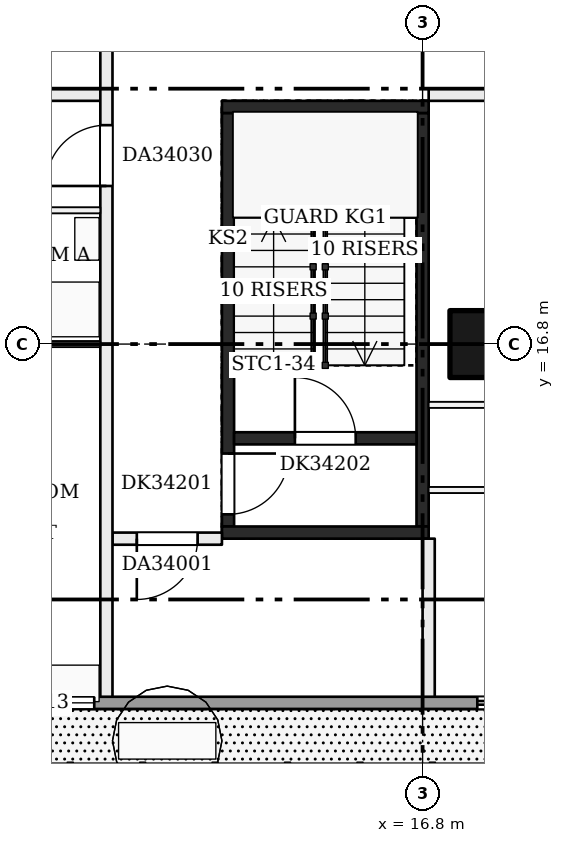
"""IFC4 building model, lengths in metres.
Left out: names, types, materials, properties, quantities, classifications, styles, units other than length and angle.
Written with IfcOpenShell. Run it as: python <this file> out.ifc"""

import sys

from ifc_helpers import new_model, si_unit, direction, frame, frame_2d, origin, origin_2d, place, context, subcontext, project, spatial, rectangle, extrude, element, fill, save


model = new_model("IFC4")
c1 = context("Model", 3, precision=1e-05, world=origin(), true_north=direction((0.0, 1.0)))
c2 = subcontext(c1, "Body", "Model", "MODEL_VIEW")
j1 = project(units=[si_unit("LENGTHUNIT", "METRE"), si_unit("PLANEANGLEUNIT", "RADIAN")], contexts=[c1])
p1 = place(None, origin())
s1 = spatial("IfcSite", under=j1, at=p1, CompositionType="ELEMENT")
p2 = place(p1, origin())
s2 = spatial("IfcBuilding", under=s1, at=p2, CompositionType="ELEMENT")
p3 = place(p2, frame((0.0, 0.0, 133.7)))
s3 = spatial("IfcBuildingStorey", under=s2, at=p3, CompositionType="ELEMENT", Elevation=133.7)
p4 = place(p3, frame((17.8, 16.8, 0.0), z_axis=(0.0, 0.0, 1.0), x_axis=(1.0, 0.0, 0.0)))
e1 = element("IfcColumn", 1, at=p4, inside=s3, PredefinedType="COLUMN", context=c2, shape_type="SweptSolid", body=[
    extrude(rectangle(XDim=1.1, YDim=1.1, at=origin_2d()), origin(), (0.0, 0.0, 1.0), 3.22),
])
p5 = place(p3, frame((13.6, 13.8, 0.0), z_axis=(0.0, 0.0, 1.0), x_axis=(0.0, 1.0, 0.0)))
e2 = element("IfcWall", 2, at=p5, inside=s3, PredefinedType="SHEAR", context=c2, shape_type="SweptSolid", body=[
    extrude(rectangle(XDim=6.8, YDim=0.2, at=frame_2d((3.4, 0.0))), origin(), (0.0, 0.0, 1.0), 3.22),
])
p6 = place(p5, frame((0.2, 0.0, 0.0)))
e3 = element("IfcOpeningElement", 3, at=p6, cuts=e2, PredefinedType="OPENING", context=c2, shape_type="SweptSolid", body=[
    extrude(rectangle(XDim=1.0, YDim=2.1, at=frame_2d((0.5, 1.05))), frame((0.0, 0.11, 0.0), z_axis=(0.0, -1.0, 0.0), x_axis=(1.0, 0.0, 0.0)), (0.0, 0.0, 1.0), 0.22),
])
p7 = place(p3, frame((16.8, 13.8, 0.0), z_axis=(0.0, 0.0, 1.0), x_axis=(0.0, 1.0, 0.0)))
e4 = element("IfcWall", 4, at=p7, inside=s3, PredefinedType="SHEAR", context=c2, shape_type="SweptSolid", body=[
    extrude(rectangle(XDim=6.8, YDim=0.2, at=frame_2d((3.4, 0.0))), origin(), (0.0, 0.0, 1.0), 3.22),
])
for number, where, z_axis, x_axis in (
    (5, (13.5, 13.7, 0.0), (0.0, 0.0, 1.0), (1.0, 0.0, 0.0)),
    (6, (13.5, 20.7, 0.0), (0.0, 0.0, 1.0), (1.0, 0.0, 0.0)),
):
    element("IfcWall", number, at=place(p3, frame(where, z_axis=z_axis, x_axis=x_axis)), inside=s3, PredefinedType="SHEAR", context=c2, shape_type="SweptSolid", body=[
        extrude(rectangle(XDim=3.4, YDim=0.2, at=frame_2d((1.7, 0.0))), origin(), (0.0, 0.0, 1.0), 3.22),
    ])
p8 = place(p3, frame((13.7, 15.25, 0.0), z_axis=(0.0, 0.0, 1.0), x_axis=(1.0, 0.0, 0.0)))
e7 = element("IfcWall", 7, at=p8, inside=s3, PredefinedType="SHEAR", context=c2, shape_type="SweptSolid", body=[
    extrude(rectangle(XDim=3.0, YDim=0.2, at=frame_2d((1.5, 0.0))), origin(), (0.0, 0.0, 1.0), 3.22),
])
p9 = place(p8, frame((1.0, 0.0, 0.0)))
e8 = element("IfcOpeningElement", 8, at=p9, cuts=e7, PredefinedType="OPENING", context=c2, shape_type="SweptSolid", body=[
    extrude(rectangle(XDim=1.0, YDim=2.1, at=frame_2d((0.5, 1.05))), frame((0.0, 0.11, 0.0), z_axis=(0.0, -1.0, 0.0), x_axis=(1.0, 0.0, 0.0)), (0.0, 0.0, 1.0), 0.22),
])
p10 = place(p3, frame((11.7, 13.6, 0.0), z_axis=(0.0, 0.0, 1.0), x_axis=(1.0, 0.0, 0.0)))
e9 = element("IfcWall", 9, at=p10, inside=s3, PredefinedType="PARTITIONING", context=c2, shape_type="SweptSolid", body=[
    extrude(rectangle(XDim=1.8, YDim=0.2, at=frame_2d((0.9, 0.0))), origin(), (0.0, 0.0, 1.0), 3.22),
])
p11 = place(p10, frame((0.4, 0.0, 0.0)))
e10 = element("IfcOpeningElement", 10, at=p11, cuts=e9, PredefinedType="OPENING", context=c2, shape_type="SweptSolid", body=[
    extrude(rectangle(XDim=1.0, YDim=2.1, at=frame_2d((0.5, 1.05))), frame((0.0, 0.11, 0.0), z_axis=(0.0, -1.0, 0.0), x_axis=(1.0, 0.0, 0.0)), (0.0, 0.0, 1.0), 0.22),
])
p12 = place(p3, frame((16.9, 14.4, 0.0), z_axis=(0.0, 0.0, 1.0), x_axis=(1.0, 0.0, 0.0)))
e11 = element("IfcWall", 11, at=p12, inside=s3, PredefinedType="PARTITIONING", context=c2, shape_type="SweptSolid", body=[
    extrude(rectangle(XDim=23.1, YDim=0.1, at=frame_2d((11.55, 0.0))), origin(), (0.0, 0.0, 1.0), 3.22),
])
p13 = place(p12, frame((5.8, 0.0, 0.0)))
e12 = element("IfcOpeningElement", 12, at=p13, cuts=e11, PredefinedType="OPENING", context=c2, shape_type="SweptSolid", body=[
    extrude(rectangle(XDim=0.9, YDim=2.1, at=frame_2d((0.45, 1.05))), frame((0.0, 0.06, 0.0), z_axis=(0.0, -1.0, 0.0), x_axis=(1.0, 0.0, 0.0)), (0.0, 0.0, 1.0), 0.12),
])
p14 = place(p12, frame((14.1, 0.0, 0.0)))
e13 = element("IfcOpeningElement", 13, at=p14, cuts=e11, PredefinedType="OPENING", context=c2, shape_type="SweptSolid", body=[
    extrude(rectangle(XDim=0.9, YDim=2.1, at=frame_2d((0.45, 1.05))), frame((0.0, 0.06, 0.0), z_axis=(0.0, -1.0, 0.0), x_axis=(1.0, 0.0, 0.0)), (0.0, 0.0, 1.0), 0.12),
])
p15 = place(p12, frame((19.5, 0.0, 0.0)))
e14 = element("IfcOpeningElement", 14, at=p15, cuts=e11, PredefinedType="OPENING", context=c2, shape_type="SweptSolid", body=[
    extrude(rectangle(XDim=0.9, YDim=2.1, at=frame_2d((0.45, 1.05))), frame((0.0, 0.06, 0.0), z_axis=(0.0, -1.0, 0.0), x_axis=(1.0, 0.0, 0.0)), (0.0, 0.0, 1.0), 0.12),
])
p16 = place(p3, frame((16.9, 15.8, 0.0), z_axis=(0.0, 0.0, 1.0), x_axis=(1.0, 0.0, 0.0)))
e15 = element("IfcWall", 15, at=p16, inside=s3, PredefinedType="PARTITIONING", context=c2, shape_type="SweptSolid", body=[
    extrude(rectangle(XDim=23.1, YDim=0.1, at=frame_2d((11.55, 0.0))), origin(), (0.0, 0.0, 1.0), 3.22),
])
p17 = place(p16, frame((1.7, 0.0, 0.0)))
e16 = element("IfcOpeningElement", 16, at=p17, cuts=e15, PredefinedType="OPENING", context=c2, shape_type="SweptSolid", body=[
    extrude(rectangle(XDim=0.9, YDim=2.1, at=frame_2d((0.45, 1.05))), frame((0.0, 0.06, 0.0), z_axis=(0.0, -1.0, 0.0), x_axis=(1.0, 0.0, 0.0)), (0.0, 0.0, 1.0), 0.12),
])
p18 = place(p16, frame((5.2, 0.0, 0.0)))
e17 = element("IfcOpeningElement", 17, at=p18, cuts=e15, PredefinedType="OPENING", context=c2, shape_type="SweptSolid", body=[
    extrude(rectangle(XDim=0.9, YDim=2.1, at=frame_2d((0.45, 1.05))), frame((0.0, 0.06, 0.0), z_axis=(0.0, -1.0, 0.0), x_axis=(1.0, 0.0, 0.0)), (0.0, 0.0, 1.0), 0.12),
])
p19 = place(p16, frame((9.4, 0.0, 0.0)))
e18 = element("IfcOpeningElement", 18, at=p19, cuts=e15, PredefinedType="OPENING", context=c2, shape_type="SweptSolid", body=[
    extrude(rectangle(XDim=0.9, YDim=2.1, at=frame_2d((0.45, 1.05))), frame((0.0, 0.06, 0.0), z_axis=(0.0, -1.0, 0.0), x_axis=(1.0, 0.0, 0.0)), (0.0, 0.0, 1.0), 0.12),
])
p20 = place(p16, frame((13.3, 0.0, 0.0)))
e19 = element("IfcOpeningElement", 19, at=p20, cuts=e15, PredefinedType="OPENING", context=c2, shape_type="SweptSolid", body=[
    extrude(rectangle(XDim=0.9, YDim=2.1, at=frame_2d((0.45, 1.05))), frame((0.0, 0.06, 0.0), z_axis=(0.0, -1.0, 0.0), x_axis=(1.0, 0.0, 0.0)), (0.0, 0.0, 1.0), 0.12),
])
p21 = place(p16, frame((17.5, 0.0, 0.0)))
e20 = element("IfcOpeningElement", 20, at=p21, cuts=e15, PredefinedType="OPENING", context=c2, shape_type="SweptSolid", body=[
    extrude(rectangle(XDim=0.9, YDim=2.1, at=frame_2d((0.45, 1.05))), frame((0.0, 0.06, 0.0), z_axis=(0.0, -1.0, 0.0), x_axis=(1.0, 0.0, 0.0)), (0.0, 0.0, 1.0), 0.12),
])
p22 = place(p16, frame((20.8, 0.0, 0.0)))
e21 = element("IfcOpeningElement", 21, at=p22, cuts=e15, PredefinedType="OPENING", context=c2, shape_type="SweptSolid", body=[
    extrude(rectangle(XDim=0.9, YDim=2.1, at=frame_2d((0.45, 1.05))), frame((0.0, 0.06, 0.0), z_axis=(0.0, -1.0, 0.0), x_axis=(1.0, 0.0, 0.0)), (0.0, 0.0, 1.0), 0.12),
])
p23 = place(p3, frame((2.5, 16.8, 0.0), z_axis=(0.0, 0.0, 1.0), x_axis=(1.0, 0.0, 0.0)))
e22 = element("IfcWall", 22, at=p23, inside=s3, PredefinedType="PARTITIONING", context=c2, shape_type="SweptSolid", body=[
    extrude(rectangle(XDim=9.0, YDim=0.1, at=frame_2d((4.5, 0.0))), origin(), (0.0, 0.0, 1.0), 3.22),
])
p24 = place(p23, frame((3.8, 0.0, 0.0)))
e23 = element("IfcOpeningElement", 23, at=p24, cuts=e22, PredefinedType="OPENING", context=c2, shape_type="SweptSolid", body=[
    extrude(rectangle(XDim=0.9, YDim=2.1, at=frame_2d((0.45, 1.05))), frame((0.0, 0.06, 0.0), z_axis=(0.0, -1.0, 0.0), x_axis=(1.0, 0.0, 0.0)), (0.0, 0.0, 1.0), 0.12),
])
p25 = place(p3, frame((7.65, 19.0, 0.0), z_axis=(0.0, 0.0, 1.0), x_axis=(1.0, 0.0, 0.0)))
e24 = element("IfcWall", 24, at=p25, inside=s3, PredefinedType="PARTITIONING", context=c2, shape_type="SweptSolid", body=[
    extrude(rectangle(XDim=3.85, YDim=0.1, at=frame_2d((1.925, 0.0))), origin(), (0.0, 0.0, 1.0), 3.22),
])
p26 = place(p3, frame((2.5, 20.9, 0.0), z_axis=(0.0, 0.0, 1.0), x_axis=(1.0, 0.0, 0.0)))
e25 = element("IfcWall", 25, at=p26, inside=s3, PredefinedType="PARTITIONING", context=c2, shape_type="SweptSolid", body=[
    extrude(rectangle(XDim=9.0, YDim=0.2, at=frame_2d((4.5, 0.0))), origin(), (0.0, 0.0, 1.0), 3.22),
])
p27 = place(p3, frame((16.9, 20.9, 0.0), z_axis=(0.0, 0.0, 1.0), x_axis=(1.0, 0.0, 0.0)))
e26 = element("IfcWall", 26, at=p27, inside=s3, PredefinedType="PARTITIONING", context=c2, shape_type="SweptSolid", body=[
    extrude(rectangle(XDim=23.3, YDim=0.2, at=frame_2d((11.65, 0.0))), origin(), (0.0, 0.0, 1.0), 3.22),
])
p28 = place(p27, frame((1.4, 0.0, 0.0)))
e27 = element("IfcOpeningElement", 27, at=p28, cuts=e26, PredefinedType="OPENING", context=c2, shape_type="SweptSolid", body=[
    extrude(rectangle(XDim=1.0, YDim=2.1, at=frame_2d((0.5, 1.05))), frame((0.0, 0.11, 0.0), z_axis=(0.0, -1.0, 0.0), x_axis=(1.0, 0.0, 0.0)), (0.0, 0.0, 1.0), 0.22),
])
p29 = place(p3, frame((11.6, 10.9, 0.0), z_axis=(0.0, 0.0, 1.0), x_axis=(0.0, 1.0, 0.0)))
e28 = element("IfcWall", 28, at=p29, inside=s3, PredefinedType="PARTITIONING", context=c2, shape_type="SweptSolid", body=[
    extrude(rectangle(XDim=31.1, YDim=0.2, at=frame_2d((15.55, 0.0))), origin(), (0.0, 0.0, 1.0), 3.22),
])
p30 = place(p29, frame((8.5, 0.0, 0.0)))
e29 = element("IfcOpeningElement", 29, at=p30, cuts=e28, PredefinedType="OPENING", context=c2, shape_type="SweptSolid", body=[
    extrude(rectangle(XDim=1.0, YDim=2.1, at=frame_2d((0.5, 1.05))), frame((0.0, 0.11, 0.0), z_axis=(0.0, -1.0, 0.0), x_axis=(1.0, 0.0, 0.0)), (0.0, 0.0, 1.0), 0.22),
])
p31 = place(p29, frame((11.2, 0.0, 0.0)))
e30 = element("IfcOpeningElement", 30, at=p31, cuts=e28, PredefinedType="OPENING", context=c2, shape_type="SweptSolid", body=[
    extrude(rectangle(XDim=1.0, YDim=2.1, at=frame_2d((0.5, 1.05))), frame((0.0, 0.11, 0.0), z_axis=(0.0, -1.0, 0.0), x_axis=(1.0, 0.0, 0.0)), (0.0, 0.0, 1.0), 0.22),
])
p32 = place(p3, frame((16.9, 10.9, 0.0), z_axis=(0.0, 0.0, 1.0), x_axis=(0.0, 1.0, 0.0)))
e31 = element("IfcWall", 31, at=p32, inside=s3, PredefinedType="PARTITIONING", context=c2, shape_type="SweptSolid", body=[
    extrude(rectangle(XDim=2.7, YDim=0.2, at=frame_2d((1.35, 0.0))), origin(), (0.0, 0.0, 1.0), 3.22),
])
p33 = place(p3, frame((4.8, 10.9, 0.0), z_axis=(0.0, 0.0, 1.0), x_axis=(1.0, 0.0, 0.0)))
e32 = element("IfcWall", 32, at=p33, inside=s3, PredefinedType="SOLIDWALL", context=c2, shape_type="SweptSolid", body=[
    extrude(rectangle(XDim=37.2, YDim=0.2, at=frame_2d((18.6, 0.0))), origin(), (0.0, 0.0, 1.0), 3.22),
])
p34 = place(p33, frame((0.3, 0.0, 0.9)))
e33 = element("IfcOpeningElement", 33, at=p34, cuts=e32, PredefinedType="OPENING", context=c2, shape_type="SweptSolid", body=[
    extrude(rectangle(XDim=2.4, YDim=1.5, at=frame_2d((1.2, 0.75))), frame((0.0, 0.11, 0.0), z_axis=(0.0, -1.0, 0.0), x_axis=(1.0, 0.0, 0.0)), (0.0, 0.0, 1.0), 0.22),
])
p35 = place(p33, frame((4.2, 0.0, 0.9)))
e34 = element("IfcOpeningElement", 34, at=p35, cuts=e32, PredefinedType="OPENING", context=c2, shape_type="SweptSolid", body=[
    extrude(rectangle(XDim=2.4, YDim=1.5, at=frame_2d((1.2, 0.75))), frame((0.0, 0.11, 0.0), z_axis=(0.0, -1.0, 0.0), x_axis=(1.0, 0.0, 0.0)), (0.0, 0.0, 1.0), 0.22),
])
p36 = place(p33, frame((12.9, 0.0, 0.0)))
e35 = element("IfcOpeningElement", 35, at=p36, cuts=e32, PredefinedType="OPENING", context=c2, shape_type="SweptSolid", body=[
    extrude(rectangle(XDim=2.4, YDim=2.2, at=frame_2d((1.2, 1.1))), frame((0.0, 0.11, 0.0), z_axis=(0.0, -1.0, 0.0), x_axis=(1.0, 0.0, 0.0)), (0.0, 0.0, 1.0), 0.22),
])
p37 = place(p33, frame((17.1, 0.0, 0.0)))
e36 = element("IfcOpeningElement", 36, at=p37, cuts=e32, PredefinedType="OPENING", context=c2, shape_type="SweptSolid", body=[
    extrude(rectangle(XDim=2.4, YDim=2.2, at=frame_2d((1.2, 1.1))), frame((0.0, 0.11, 0.0), z_axis=(0.0, -1.0, 0.0), x_axis=(1.0, 0.0, 0.0)), (0.0, 0.0, 1.0), 0.22),
])
p38 = place(p33, frame((21.3, 0.0, 0.0)))
e37 = element("IfcOpeningElement", 37, at=p38, cuts=e32, PredefinedType="OPENING", context=c2, shape_type="SweptSolid", body=[
    extrude(rectangle(XDim=2.4, YDim=2.2, at=frame_2d((1.2, 1.1))), frame((0.0, 0.11, 0.0), z_axis=(0.0, -1.0, 0.0), x_axis=(1.0, 0.0, 0.0)), (0.0, 0.0, 1.0), 0.22),
])
p39 = place(p33, frame((25.5, 0.0, 0.9)))
e38 = element("IfcOpeningElement", 38, at=p39, cuts=e32, PredefinedType="OPENING", context=c2, shape_type="SweptSolid", body=[
    extrude(rectangle(XDim=2.4, YDim=1.5, at=frame_2d((1.2, 0.75))), frame((0.0, 0.11, 0.0), z_axis=(0.0, -1.0, 0.0), x_axis=(1.0, 0.0, 0.0)), (0.0, 0.0, 1.0), 0.22),
])
p40 = place(p33, frame((29.7, 0.0, 0.9)))
e39 = element("IfcOpeningElement", 39, at=p40, cuts=e32, PredefinedType="OPENING", context=c2, shape_type="SweptSolid", body=[
    extrude(rectangle(XDim=2.4, YDim=1.5, at=frame_2d((1.2, 0.75))), frame((0.0, 0.11, 0.0), z_axis=(0.0, -1.0, 0.0), x_axis=(1.0, 0.0, 0.0)), (0.0, 0.0, 1.0), 0.22),
])
p41 = place(p33, frame((33.9, 0.0, 0.9)))
e40 = element("IfcOpeningElement", 40, at=p41, cuts=e32, PredefinedType="OPENING", context=c2, shape_type="SweptSolid", body=[
    extrude(rectangle(XDim=1.3, YDim=1.5, at=frame_2d((0.65, 0.75))), frame((0.0, 0.11, 0.0), z_axis=(0.0, -1.0, 0.0), x_axis=(1.0, 0.0, 0.0)), (0.0, 0.0, 1.0), 0.22),
])
p42 = place(p6, frame((1.0, 0.0, 0.0), z_axis=(0.0, 0.0, 1.0), x_axis=(-1.0, 0.0, 0.0)))
e41 = element("IfcDoor", 41, at=p42, inside=s3, OperationType="SINGLE_SWING_LEFT", PredefinedType="DOOR", context=c2, shape_type="SweptSolid", body=[
    extrude(rectangle(XDim=1.0, YDim=2.1, at=frame_2d((0.5, 1.05))), frame((0.0, 0.025, 0.0), z_axis=(0.0, -1.0, 0.0), x_axis=(1.0, 0.0, 0.0)), (0.0, 0.0, 1.0), 0.05),
])
fill(e3, e41)
p43 = place(p9, origin())
e42 = element("IfcDoor", 42, at=p43, inside=s3, OperationType="SINGLE_SWING_LEFT", PredefinedType="DOOR", context=c2, shape_type="SweptSolid", body=[
    extrude(rectangle(XDim=1.0, YDim=2.1, at=frame_2d((0.5, 1.05))), frame((0.0, 0.025, 0.0), z_axis=(0.0, -1.0, 0.0), x_axis=(1.0, 0.0, 0.0)), (0.0, 0.0, 1.0), 0.05),
])
fill(e8, e42)
p44 = place(p11, frame((1.0, 0.0, 0.0), z_axis=(0.0, 0.0, 1.0), x_axis=(-1.0, 0.0, 0.0)))
e43 = element("IfcDoor", 43, at=p44, inside=s3, OperationType="SINGLE_SWING_RIGHT", PredefinedType="DOOR", context=c2, shape_type="SweptSolid", body=[
    extrude(rectangle(XDim=1.0, YDim=2.1, at=frame_2d((0.5, 1.05))), frame((0.0, 0.025, 0.0), z_axis=(0.0, -1.0, 0.0), x_axis=(1.0, 0.0, 0.0)), (0.0, 0.0, 1.0), 0.05),
])
fill(e10, e43)
p45 = place(p30, origin())
e44 = element("IfcDoor", 44, at=p45, inside=s3, OperationType="SINGLE_SWING_LEFT", PredefinedType="DOOR", context=c2, shape_type="SweptSolid", body=[
    extrude(rectangle(XDim=1.0, YDim=2.1, at=frame_2d((0.5, 1.05))), frame((0.0, 0.025, 0.0), z_axis=(0.0, -1.0, 0.0), x_axis=(1.0, 0.0, 0.0)), (0.0, 0.0, 1.0), 0.05),
])
fill(e29, e44)
p46 = place(p35, origin())
e45 = element("IfcWindow", 45, at=p46, inside=s3, PartitioningType="SINGLE_PANEL", PredefinedType="WINDOW", context=c2, shape_type="SweptSolid", body=[
    extrude(rectangle(XDim=2.4, YDim=1.5, at=frame_2d((1.2, 0.75))), frame((0.0, 0.03, 0.0), z_axis=(0.0, -1.0, 0.0), x_axis=(1.0, 0.0, 0.0)), (0.0, 0.0, 1.0), 0.06),
])
fill(e34, e45)
p47 = place(p36, origin())
e46 = element("IfcDoor", 46, at=p47, inside=s3, OperationType="DOUBLE_DOOR_SLIDING", PredefinedType="DOOR", context=c2, shape_type="SweptSolid", body=[
    extrude(rectangle(XDim=2.4, YDim=2.2, at=frame_2d((1.2, 1.1))), frame((0.0, 0.025, 0.0), z_axis=(0.0, -1.0, 0.0), x_axis=(1.0, 0.0, 0.0)), (0.0, 0.0, 1.0), 0.05),
])
fill(e35, e46)
save(model, sys.argv[1])
